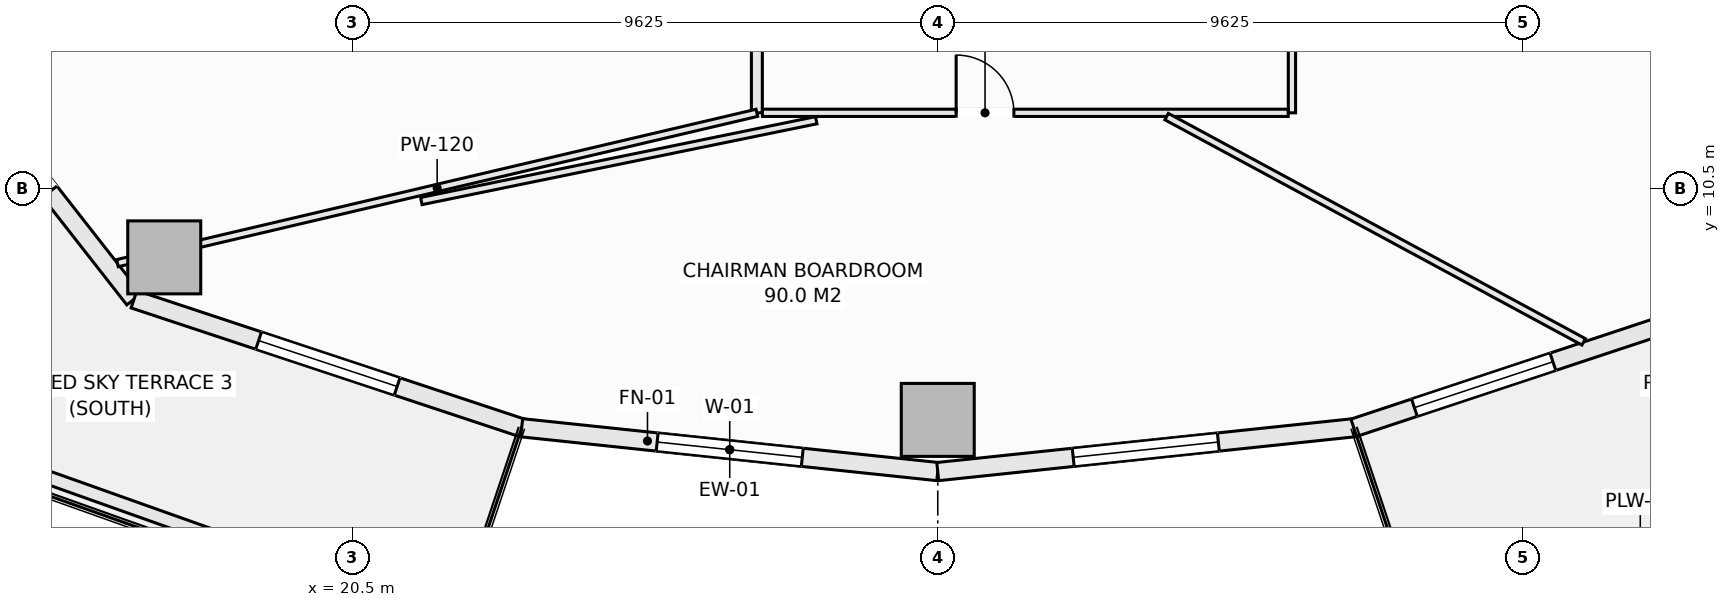
"""IFC4 building model, lengths in metres.
Left out: names, types, materials, properties, quantities, classifications, styles, units other than length and angle.
Written with IfcOpenShell. Run it as: python <this file> out.ifc"""

import sys

from ifc_helpers import new_model, si_unit, direction, frame, frame_2d, origin, origin_2d, place, context, subcontext, project, spatial, rectangle, extrude, element, fill, save


model = new_model("IFC4")
c1 = context("Model", 3, precision=1e-05, world=origin(), true_north=direction((0.0, 1.0)))
c2 = subcontext(c1, "Body", "Model", "MODEL_VIEW")
j1 = project(units=[si_unit("LENGTHUNIT", "METRE"), si_unit("PLANEANGLEUNIT", "RADIAN")], contexts=[c1])
p1 = place(None, origin())
s1 = spatial("IfcSite", under=j1, at=p1, CompositionType="ELEMENT")
p2 = place(p1, origin())
s2 = spatial("IfcBuilding", under=s1, at=p2, CompositionType="ELEMENT")
p3 = place(p2, frame((0.0, 0.0, 91.95)))
s3 = spatial("IfcBuildingStorey", under=s2, at=p3, CompositionType="ELEMENT", Elevation=91.95)
for number, where, z_axis, x_axis in (
    (1, (17.404, 9.373, -0.28), (0.0, 0.0, 1.0), (1.0, 0.0, 0.0)),
    (2, (30.125, 6.7, -0.28), (0.0, 0.0, 1.0), (1.0, 0.0, 0.0)),
):
    element("IfcColumn", number, at=place(p3, frame(where, z_axis=z_axis, x_axis=x_axis)), inside=s3, PredefinedType="COLUMN", context=c2, shape_type="SweptSolid", body=[
        extrude(rectangle(XDim=1.2, YDim=1.2, at=origin_2d()), origin(), (0.0, 0.0, 1.0), 3.81),
    ])
p4 = place(p3, frame((13.026, 13.64, 0.0), z_axis=(0.0, 0.0, 1.0), x_axis=(0.616434798832, -0.78740595552, 0.0)))
e3 = element("IfcWall", 3, at=p4, inside=s3, PredefinedType="SOLIDWALL", context=c2, shape_type="SweptSolid", body=[
    extrude(rectangle(XDim=6.294, YDim=0.3, at=frame_2d((3.147, 0.0))), origin(), (0.0, 0.0, 1.0), 3.053),
])
p5 = place(p4, frame((2.247, 0.0, 0.0)))
e4 = element("IfcOpeningElement", 4, at=p5, cuts=e3, PredefinedType="OPENING", context=c2, shape_type="SweptSolid", body=[
    extrude(rectangle(XDim=1.8, YDim=2.25, at=frame_2d((0.9, 1.125))), frame((0.0, 0.16, 0.0), z_axis=(0.0, -1.0, 0.0), x_axis=(1.0, 0.0, 0.0)), (0.0, 0.0, 1.0), 0.32),
])
p6 = place(p3, frame((16.906, 8.684, 0.0), z_axis=(0.0, 0.0, 1.0), x_axis=(0.949245153629, -0.314537181127, 0.0)))
e5 = element("IfcWall", 5, at=p6, inside=s3, PredefinedType="SOLIDWALL", context=c2, shape_type="SweptSolid", body=[
    extrude(rectangle(XDim=6.717, YDim=0.3, at=frame_2d((3.358, 0.0))), origin(), (0.0, 0.0, 1.0), 3.053),
])
p7 = place(p6, frame((2.159, 0.0, 0.85)))
e6 = element("IfcOpeningElement", 6, at=p7, cuts=e5, PredefinedType="OPENING", context=c2, shape_type="SweptSolid", body=[
    extrude(rectangle(XDim=2.4, YDim=1.9, at=frame_2d((1.2, 0.95))), frame((0.0, 0.16, 0.0), z_axis=(0.0, -1.0, 0.0), x_axis=(1.0, 0.0, 0.0)), (0.0, 0.0, 1.0), 0.32),
])
p8 = place(p3, frame((23.282, 6.571, 0.0), z_axis=(0.0, 0.0, 1.0), x_axis=(0.994498840295, -0.104747585419, 0.0)))
e7 = element("IfcWall", 7, at=p8, inside=s3, PredefinedType="SOLIDWALL", context=c2, shape_type="SweptSolid", body=[
    extrude(rectangle(XDim=6.88, YDim=0.3, at=frame_2d((3.44, 0.0))), origin(), (0.0, 0.0, 1.0), 3.053),
])
p9 = place(p8, frame((2.24, 0.0, 0.85)))
e8 = element("IfcOpeningElement", 8, at=p9, cuts=e7, PredefinedType="OPENING", context=c2, shape_type="SweptSolid", body=[
    extrude(rectangle(XDim=2.4, YDim=1.9, at=frame_2d((1.2, 0.95))), frame((0.0, 0.16, 0.0), z_axis=(0.0, -1.0, 0.0), x_axis=(1.0, 0.0, 0.0)), (0.0, 0.0, 1.0), 0.32),
])
p10 = place(p3, frame((30.125, 5.85, 0.0), z_axis=(0.0, 0.0, 1.0), x_axis=(0.994498840295, 0.104747585419, 0.0)))
e9 = element("IfcWall", 9, at=p10, inside=s3, PredefinedType="SOLIDWALL", context=c2, shape_type="SweptSolid", body=[
    extrude(rectangle(XDim=6.88, YDim=0.3, at=frame_2d((3.44, 0.0))), origin(), (0.0, 0.0, 1.0), 3.053),
])
p11 = place(p10, frame((2.24, 0.0, 0.85)))
e10 = element("IfcOpeningElement", 10, at=p11, cuts=e9, PredefinedType="OPENING", context=c2, shape_type="SweptSolid", body=[
    extrude(rectangle(XDim=2.4, YDim=1.9, at=frame_2d((1.2, 0.95))), frame((0.0, 0.16, 0.0), z_axis=(0.0, -1.0, 0.0), x_axis=(1.0, 0.0, 0.0)), (0.0, 0.0, 1.0), 0.32),
])
p12 = place(p3, frame((36.968, 6.571, 0.0), z_axis=(0.0, 0.0, 1.0), x_axis=(0.949245153629, 0.314537181127, 0.0)))
e11 = element("IfcWall", 11, at=p12, inside=s3, PredefinedType="SOLIDWALL", context=c2, shape_type="SweptSolid", body=[
    extrude(rectangle(XDim=6.717, YDim=0.3, at=frame_2d((3.358, 0.0))), origin(), (0.0, 0.0, 1.0), 3.053),
])
p13 = place(p12, frame((1.05, 0.0, 0.85)))
e12 = element("IfcOpeningElement", 12, at=p13, cuts=e11, PredefinedType="OPENING", context=c2, shape_type="SweptSolid", body=[
    extrude(rectangle(XDim=2.4, YDim=1.9, at=frame_2d((1.2, 0.95))), frame((0.0, 0.16, 0.0), z_axis=(0.0, -1.0, 0.0), x_axis=(1.0, 0.0, 0.0)), (0.0, 0.0, 1.0), 0.32),
])
for number, where, z_axis, x_axis in (
    (13, (14.893, 5.965, 0.0), (0.0, 0.0, 1.0), (0.942, -0.335, 0.0)),
    (14, (38.001, 3.349, 0.0), (0.0, 0.0, 1.0), (0.942, 0.335, 0.0)),
):
    element("IfcWall", number, at=place(p3, frame(where, z_axis=z_axis, x_axis=x_axis)), inside=s3, PredefinedType="PARAPET", context=c2, shape_type="SweptSolid", body=[
        extrude(rectangle(XDim=7.807, YDim=0.22, at=frame_2d((3.904, 0.0))), origin(), (0.0, 0.0, 1.0), 0.52),
    ])
p14 = place(p3, frame((27.15, 11.75, 0.0), z_axis=(0.0, 0.0, 1.0), x_axis=(0.0, 1.0, 0.0)))
e15 = element("IfcWall", 15, at=p14, inside=s3, PredefinedType="SOLIDWALL", context=c2, shape_type="SweptSolid", body=[
    extrude(rectangle(XDim=5.208, YDim=0.18, at=frame_2d((2.604, 0.0))), origin(), (0.0, 0.0, 1.0), 3.53),
])
p15 = place(p14, frame((1.535, 0.0, 0.0)))
e16 = element("IfcOpeningElement", 16, at=p15, cuts=e15, PredefinedType="OPENING", context=c2, shape_type="SweptSolid", body=[
    extrude(rectangle(XDim=0.95, YDim=2.1, at=frame_2d((0.475, 1.05))), frame((0.0, 0.1, 0.0), z_axis=(0.0, -1.0, 0.0), x_axis=(1.0, 0.0, 0.0)), (0.0, 0.0, 1.0), 0.2),
])
p16 = place(p3, frame((35.95, 11.75, 0.0), z_axis=(0.0, 0.0, 1.0), x_axis=(0.0, 1.0, 0.0)))
e17 = element("IfcWall", 17, at=p16, inside=s3, PredefinedType="PARTITIONING", context=c2, shape_type="SweptSolid", body=[
    extrude(rectangle(XDim=3.838, YDim=0.12, at=frame_2d((1.919, 0.0))), origin(), (0.0, 0.0, 1.0), 3.53),
])
p17 = place(p3, frame((27.242, 11.75, 0.0), z_axis=(0.0, 0.0, 1.0), x_axis=(1.0, 0.0, 0.0)))
e18 = element("IfcWall", 18, at=p17, inside=s3, PredefinedType="PARTITIONING", context=c2, shape_type="SweptSolid", body=[
    extrude(rectangle(XDim=8.646, YDim=0.12, at=frame_2d((4.323, 0.0))), origin(), (0.0, 0.0, 1.0), 3.53),
])
p18 = place(p17, frame((3.186, 0.0, 0.0)))
e19 = element("IfcOpeningElement", 19, at=p18, cuts=e18, PredefinedType="OPENING", context=c2, shape_type="SweptSolid", body=[
    extrude(rectangle(XDim=0.95, YDim=2.1, at=frame_2d((0.475, 1.05))), frame((0.0, 0.07, 0.0), z_axis=(0.0, -1.0, 0.0), x_axis=(1.0, 0.0, 0.0)), (0.0, 0.0, 1.0), 0.14),
])
p19 = place(p3, frame((33.889, 11.688, 0.0), z_axis=(0.0, 0.0, 1.0), x_axis=(0.879862970093, -0.475227475909, 0.0)))
e20 = element("IfcWall", 20, at=p19, inside=s3, PredefinedType="PARTITIONING", context=c2, shape_type="SweptSolid", body=[
    extrude(rectangle(XDim=7.795, YDim=0.12, at=frame_2d((3.898, 0.0))), origin(), (0.0, 0.0, 1.0), 3.53),
])
p20 = place(p3, frame((16.634, 9.278, 0.0), z_axis=(0.0, 0.0, 1.0), x_axis=(0.973467827541, 0.228823925195, 0.0)))
e21 = element("IfcWall", 21, at=p20, inside=s3, PredefinedType="PARTITIONING", context=c2, shape_type="SweptSolid", body=[
    extrude(rectangle(XDim=10.803, YDim=0.12, at=frame_2d((5.401, 0.0))), origin(), (0.0, 0.0, 1.0), 3.053),
])
p21 = place(p3, frame((21.632, 10.299, 0.0), z_axis=(0.0, 0.0, 1.0), x_axis=(0.979686821634, 0.200533616924, 0.0)))
e22 = element("IfcWall", 22, at=p21, inside=s3, PredefinedType="PARTITIONING", context=c2, shape_type="SweptSolid", body=[
    extrude(rectangle(XDim=6.629, YDim=0.12, at=frame_2d((3.314, 0.0))), origin(), (0.0, 0.0, 1.0), 3.53),
])
p22 = place(p7, origin())
e23 = element("IfcWindow", 23, at=p22, inside=s3, PartitioningType="SINGLE_PANEL", PredefinedType="WINDOW", context=c2, shape_type="SweptSolid", body=[
    extrude(rectangle(XDim=2.4, YDim=1.9, at=frame_2d((1.2, 0.95))), frame((0.0, 0.03, 0.0), z_axis=(0.0, -1.0, 0.0), x_axis=(1.0, 0.0, 0.0)), (0.0, 0.0, 1.0), 0.06),
])
fill(e6, e23)
p23 = place(p9, origin())
e24 = element("IfcWindow", 24, at=p23, inside=s3, PartitioningType="SINGLE_PANEL", PredefinedType="WINDOW", context=c2, shape_type="SweptSolid", body=[
    extrude(rectangle(XDim=2.4, YDim=1.9, at=frame_2d((1.2, 0.95))), frame((0.0, 0.03, 0.0), z_axis=(0.0, -1.0, 0.0), x_axis=(1.0, 0.0, 0.0)), (0.0, 0.0, 1.0), 0.06),
])
fill(e8, e24)
p24 = place(p11, origin())
e25 = element("IfcWindow", 25, at=p24, inside=s3, PartitioningType="SINGLE_PANEL", PredefinedType="WINDOW", context=c2, shape_type="SweptSolid", body=[
    extrude(rectangle(XDim=2.4, YDim=1.9, at=frame_2d((1.2, 0.95))), frame((0.0, 0.03, 0.0), z_axis=(0.0, -1.0, 0.0), x_axis=(1.0, 0.0, 0.0)), (0.0, 0.0, 1.0), 0.06),
])
fill(e10, e25)
p25 = place(p13, origin())
e26 = element("IfcWindow", 26, at=p25, inside=s3, PartitioningType="SINGLE_PANEL", PredefinedType="WINDOW", context=c2, shape_type="SweptSolid", body=[
    extrude(rectangle(XDim=2.4, YDim=1.9, at=frame_2d((1.2, 0.95))), frame((0.0, 0.03, 0.0), z_axis=(0.0, -1.0, 0.0), x_axis=(1.0, 0.0, 0.0)), (0.0, 0.0, 1.0), 0.06),
])
fill(e12, e26)
p26 = place(p18, origin())
e27 = element("IfcDoor", 27, at=p26, inside=s3, OperationType="SINGLE_SWING_LEFT", PredefinedType="DOOR", context=c2, shape_type="SweptSolid", body=[
    extrude(rectangle(XDim=0.95, YDim=2.1, at=frame_2d((0.475, 1.05))), frame((0.0, 0.025, 0.0), z_axis=(0.0, -1.0, 0.0), x_axis=(1.0, 0.0, 0.0)), (0.0, 0.0, 1.0), 0.05),
])
fill(e19, e27)
save(model, sys.argv[1])
